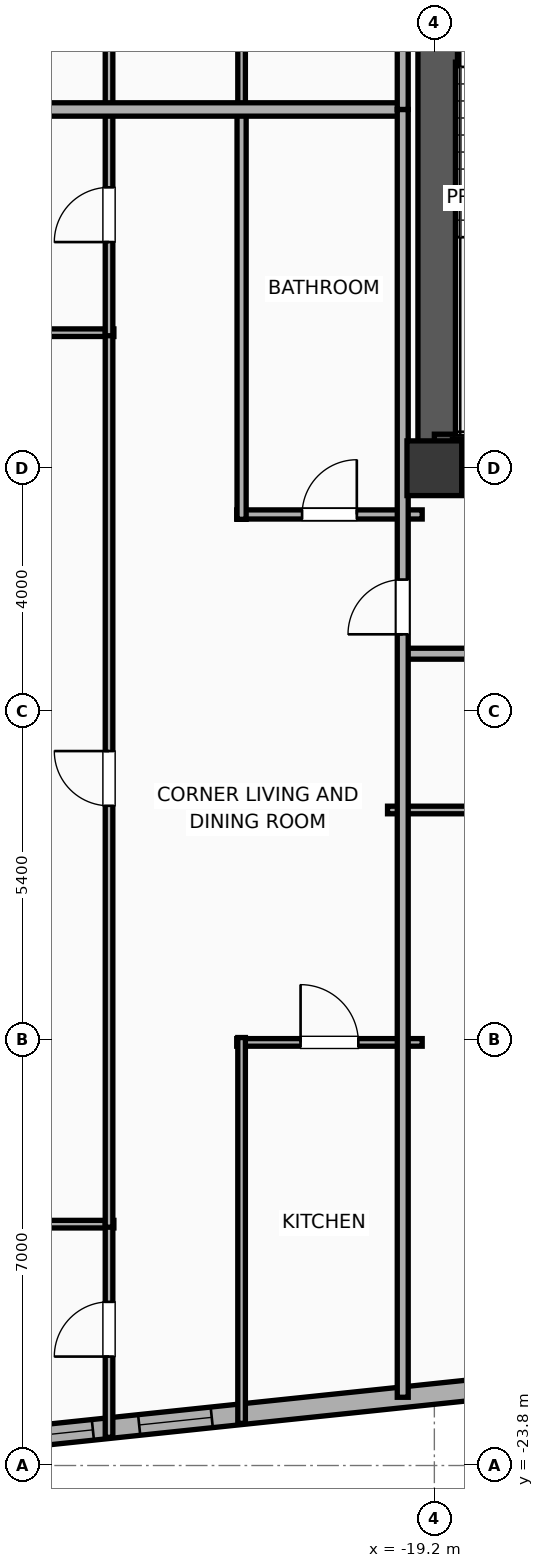
"""IFC4 building model, lengths in metres.
Left out: names, types, materials, properties, quantities, classifications, styles, units other than length and angle.
Written with IfcOpenShell. Run it as: python <this file> out.ifc"""

import sys

from ifc_helpers import new_model, si_unit, direction, frame, frame_2d, origin, origin_2d, place, context, subcontext, project, spatial, rectangle, extrude, element, fill, save


model = new_model("IFC4")
c1 = context("Model", 3, precision=1e-05, world=origin(), true_north=direction((0.0, 1.0)))
c2 = subcontext(c1, "Body", "Model", "MODEL_VIEW")
j1 = project(units=[si_unit("LENGTHUNIT", "METRE"), si_unit("PLANEANGLEUNIT", "RADIAN")], contexts=[c1])
p1 = place(None, origin())
s1 = spatial("IfcSite", under=j1, at=p1, CompositionType="ELEMENT")
p2 = place(p1, origin())
s2 = spatial("IfcBuilding", under=s1, at=p2, CompositionType="ELEMENT")
p3 = place(p2, frame((0.0, 0.0, 159.9)))
s3 = spatial("IfcBuildingStorey", under=s2, at=p3, CompositionType="ELEMENT", Elevation=159.9)
p4 = place(p3, frame((-19.2, -7.4, 0.0), z_axis=(0.0, 0.0, 1.0), x_axis=(1.0, 0.0, 0.0)))
e1 = element("IfcColumn", 1, at=p4, inside=s3, PredefinedType="COLUMN", context=c2, shape_type="SweptSolid", body=[
    extrude(rectangle(XDim=0.9, YDim=0.9, at=origin_2d()), origin(), (0.0, 0.0, 1.0), 3.9),
])
p5 = place(p3, frame((-19.425, -7.4, 0.0), z_axis=(0.0, 0.0, 1.0), x_axis=(1.0, 0.0, 0.0)))
e2 = element("IfcWall", 2, at=p5, inside=s3, PredefinedType="SHEAR", context=c2, shape_type="SweptSolid", body=[
    extrude(rectangle(XDim=7.25, YDim=0.45, at=frame_2d((3.625, 0.0))), origin(), (0.0, 0.0, 1.0), 3.65),
])
p6 = place(p3, frame((-19.145, -7.4, 0.0), z_axis=(0.0, 0.0, 1.0), x_axis=(0.0, 1.0, 0.0)))
e3 = element("IfcWall", 3, at=p6, inside=s3, PredefinedType="SHEAR", context=c2, shape_type="SweptSolid", body=[
    extrude(rectangle(XDim=14.8, YDim=0.65, at=frame_2d((7.4, 0.0))), origin(), (0.0, 0.0, 1.0), 3.65),
])
p7 = place(p3, frame((-19.2, -6.965, 0.0), z_axis=(0.0, 0.0, 1.0), x_axis=(1.0, 0.0, 0.0)))
e4 = element("IfcWall", 4, at=p7, inside=s3, PredefinedType="SOLIDWALL", context=c2, shape_type="SweptSolid", body=[
    extrude(rectangle(XDim=3.46, YDim=0.25, at=frame_2d((1.73, 0.0))), origin(), (0.0, 0.0, 1.0), 3.65),
])
p8 = place(p3, frame((24.756, -18.003, 0.0), z_axis=(0.0, 0.0, 1.0), x_axis=(-0.99452160744, -0.104531202687, 0.0)))
e5 = element("IfcWall", 5, at=p8, inside=s3, PredefinedType="ELEMENTEDWALL", context=c2, shape_type="SweptSolid", body=[
    extrude(rectangle(XDim=51.967, YDim=0.34, at=frame_2d((25.983, 0.0))), origin(), (0.0, 0.0, 1.0), 3.65),
])
p9 = place(p8, frame((25.633, 0.0, 0.75)))
e6 = element("IfcOpeningElement", 6, at=p9, cuts=e5, PredefinedType="OPENING", context=c2, shape_type="SweptSolid", body=[
    extrude(rectangle(XDim=2.4, YDim=2.1, at=frame_2d((1.2, 1.05))), frame((0.0, 0.18, 0.0), z_axis=(0.0, -1.0, 0.0), x_axis=(1.0, 0.0, 0.0)), (0.0, 0.0, 1.0), 0.36),
])
p10 = place(p8, frame((42.369, 0.0, 0.75)))
e7 = element("IfcOpeningElement", 7, at=p10, cuts=e5, PredefinedType="OPENING", context=c2, shape_type="SweptSolid", body=[
    extrude(rectangle(XDim=1.2, YDim=2.05, at=frame_2d((0.6, 1.025))), frame((0.0, 0.18, 0.0), z_axis=(0.0, -1.0, 0.0), x_axis=(1.0, 0.0, 0.0)), (0.0, 0.0, 1.0), 0.36),
])
p11 = place(p8, frame((34.085, 0.0, 0.75)))
e8 = element("IfcOpeningElement", 8, at=p11, cuts=e5, PredefinedType="OPENING", context=c2, shape_type="SweptSolid", body=[
    extrude(rectangle(XDim=1.2, YDim=2.05, at=frame_2d((0.6, 1.025))), frame((0.0, 0.18, 0.0), z_axis=(0.0, -1.0, 0.0), x_axis=(1.0, 0.0, 0.0)), (0.0, 0.0, 1.0), 0.36),
])
p12 = place(p8, frame((36.993, 0.0, 0.75)))
e9 = element("IfcOpeningElement", 9, at=p12, cuts=e5, PredefinedType="OPENING", context=c2, shape_type="SweptSolid", body=[
    extrude(rectangle(XDim=1.2, YDim=2.05, at=frame_2d((0.6, 1.025))), frame((0.0, 0.18, 0.0), z_axis=(0.0, -1.0, 0.0), x_axis=(1.0, 0.0, 0.0)), (0.0, 0.0, 1.0), 0.36),
])
p13 = place(p8, frame((14.397, 0.0, 0.75)))
e10 = element("IfcOpeningElement", 10, at=p13, cuts=e5, PredefinedType="OPENING", context=c2, shape_type="SweptSolid", body=[
    extrude(rectangle(XDim=1.2, YDim=2.05, at=frame_2d((0.6, 1.025))), frame((0.0, 0.18, 0.0), z_axis=(0.0, -1.0, 0.0), x_axis=(1.0, 0.0, 0.0)), (0.0, 0.0, 1.0), 0.36),
])
p14 = place(p8, frame((11.489, 0.0, 0.75)))
e11 = element("IfcOpeningElement", 11, at=p14, cuts=e5, PredefinedType="OPENING", context=c2, shape_type="SweptSolid", body=[
    extrude(rectangle(XDim=1.2, YDim=2.05, at=frame_2d((0.6, 1.025))), frame((0.0, 0.18, 0.0), z_axis=(0.0, -1.0, 0.0), x_axis=(1.0, 0.0, 0.0)), (0.0, 0.0, 1.0), 0.36),
])
p15 = place(p8, frame((8.521, 0.0, 0.75)))
e12 = element("IfcOpeningElement", 12, at=p15, cuts=e5, PredefinedType="OPENING", context=c2, shape_type="SweptSolid", body=[
    extrude(rectangle(XDim=1.2, YDim=2.05, at=frame_2d((0.6, 1.025))), frame((0.0, 0.18, 0.0), z_axis=(0.0, -1.0, 0.0), x_axis=(1.0, 0.0, 0.0)), (0.0, 0.0, 1.0), 0.36),
])
p16 = place(p8, frame((5.582, 0.0, 0.75)))
e13 = element("IfcOpeningElement", 13, at=p16, cuts=e5, PredefinedType="OPENING", context=c2, shape_type="SweptSolid", body=[
    extrude(rectangle(XDim=1.2, YDim=2.05, at=frame_2d((0.6, 1.025))), frame((0.0, 0.18, 0.0), z_axis=(0.0, -1.0, 0.0), x_axis=(1.0, 0.0, 0.0)), (0.0, 0.0, 1.0), 0.36),
])
p17 = place(p8, frame((29.313, 0.0, 0.75)))
e14 = element("IfcOpeningElement", 14, at=p17, cuts=e5, PredefinedType="OPENING", context=c2, shape_type="SweptSolid", body=[
    extrude(rectangle(XDim=1.2, YDim=2.05, at=frame_2d((0.6, 1.025))), frame((0.0, 0.18, 0.0), z_axis=(0.0, -1.0, 0.0), x_axis=(1.0, 0.0, 0.0)), (0.0, 0.0, 1.0), 0.36),
])
p18 = place(p8, frame((22.248, 0.0, 0.75)))
e15 = element("IfcOpeningElement", 15, at=p18, cuts=e5, PredefinedType="OPENING", context=c2, shape_type="SweptSolid", body=[
    extrude(rectangle(XDim=1.2, YDim=2.05, at=frame_2d((0.6, 1.025))), frame((0.0, 0.18, 0.0), z_axis=(0.0, -1.0, 0.0), x_axis=(1.0, 0.0, 0.0)), (0.0, 0.0, 1.0), 0.36),
])
p19 = place(p8, frame((18.186, 0.0, 0.75)))
e16 = element("IfcOpeningElement", 16, at=p19, cuts=e5, PredefinedType="OPENING", context=c2, shape_type="SweptSolid", body=[
    extrude(rectangle(XDim=1.2, YDim=2.05, at=frame_2d((0.6, 1.025))), frame((0.0, 0.18, 0.0), z_axis=(0.0, -1.0, 0.0), x_axis=(1.0, 0.0, 0.0)), (0.0, 0.0, 1.0), 0.36),
])
p20 = place(p8, frame((47.879, 0.0, 0.75)))
e17 = element("IfcOpeningElement", 17, at=p20, cuts=e5, PredefinedType="OPENING", context=c2, shape_type="SweptSolid", body=[
    extrude(rectangle(XDim=1.2, YDim=2.05, at=frame_2d((0.6, 1.025))), frame((0.0, 0.18, 0.0), z_axis=(0.0, -1.0, 0.0), x_axis=(1.0, 0.0, 0.0)), (0.0, 0.0, 1.0), 0.36),
])
p21 = place(p8, frame((49.844, 0.0, 0.75)))
e18 = element("IfcOpeningElement", 18, at=p21, cuts=e5, PredefinedType="OPENING", context=c2, shape_type="SweptSolid", body=[
    extrude(rectangle(XDim=1.2, YDim=2.05, at=frame_2d((0.6, 1.025))), frame((0.0, 0.18, 0.0), z_axis=(0.0, -1.0, 0.0), x_axis=(1.0, 0.0, 0.0)), (0.0, 0.0, 1.0), 0.36),
])
p22 = place(p3, frame((-19.97, -13.02, 0.0), z_axis=(0.0, 0.0, 1.0), x_axis=(1.0, 0.0, 0.0)))
e19 = element("IfcWall", 19, at=p22, inside=s3, PredefinedType="PARTITIONING", context=c2, shape_type="SweptSolid", body=[
    extrude(rectangle(XDim=2.63, YDim=0.125, at=frame_2d((1.315, 0.0))), origin(), (0.0, 0.0, 1.0), 3.65),
])
p23 = place(p3, frame((-19.75, -10.45, 0.0), z_axis=(0.0, 0.0, 1.0), x_axis=(1.0, 0.0, 0.0)))
e20 = element("IfcWall", 20, at=p23, inside=s3, PredefinedType="PARTITIONING", context=c2, shape_type="SweptSolid", body=[
    extrude(rectangle(XDim=11.67, YDim=0.18, at=frame_2d((5.835, 0.0))), origin(), (0.0, 0.0, 1.0), 3.65),
])
p24 = place(p23, frame((2.664, 0.0, 0.0)))
e21 = element("IfcOpeningElement", 21, at=p24, cuts=e20, PredefinedType="OPENING", context=c2, shape_type="SweptSolid", body=[
    extrude(rectangle(XDim=0.9, YDim=2.05, at=frame_2d((0.45, 1.025))), frame((0.0, 0.1, 0.0), z_axis=(0.0, -1.0, 0.0), x_axis=(1.0, 0.0, 0.0)), (0.0, 0.0, 1.0), 0.2),
])
p25 = place(p23, frame((9.404, 0.0, 0.0)))
e22 = element("IfcOpeningElement", 22, at=p25, cuts=e20, PredefinedType="OPENING", context=c2, shape_type="SweptSolid", body=[
    extrude(rectangle(XDim=1.15, YDim=2.05, at=frame_2d((0.575, 1.025))), frame((0.0, 0.1, 0.0), z_axis=(0.0, -1.0, 0.0), x_axis=(1.0, 0.0, 0.0)), (0.0, 0.0, 1.0), 0.2),
])
p26 = place(p3, frame((-31.123, -19.831, 0.0), z_axis=(0.0, 0.0, 1.0), x_axis=(1.0, 0.0, 0.0)))
e23 = element("IfcWall", 23, at=p26, inside=s3, PredefinedType="PARTITIONING", context=c2, shape_type="SweptSolid", body=[
    extrude(rectangle(XDim=6.653, YDim=0.125, at=frame_2d((3.326, 0.0))), origin(), (0.0, 0.0, 1.0), 3.65),
])
p27 = place(p3, frame((-32.664, -5.171, 0.0), z_axis=(0.0, 0.0, 1.0), x_axis=(1.0, 0.0, 0.0)))
e24 = element("IfcWall", 24, at=p27, inside=s3, PredefinedType="PARTITIONING", context=c2, shape_type="SweptSolid", body=[
    extrude(rectangle(XDim=8.194, YDim=0.125, at=frame_2d((4.097, 0.0))), origin(), (0.0, 0.0, 1.0), 3.65),
])
p28 = place(p3, frame((-24.55, -23.336, 0.0), z_axis=(0.0, 0.0, 1.0), x_axis=(0.0, 1.0, 0.0)))
e25 = element("IfcWall", 25, at=p28, inside=s3, PredefinedType="PARTITIONING", context=c2, shape_type="SweptSolid", body=[
    extrude(rectangle(XDim=3.555, YDim=0.125, at=frame_2d((1.778, 0.0))), origin(), (0.0, 0.0, 1.0), 3.65),
])
p29 = place(p28, frame((1.328, 0.0, 0.0)))
e26 = element("IfcOpeningElement", 26, at=p29, cuts=e25, PredefinedType="OPENING", context=c2, shape_type="SweptSolid", body=[
    extrude(rectangle(XDim=0.9, YDim=2.05, at=frame_2d((0.45, 1.025))), frame((0.0, 0.073, 0.0), z_axis=(0.0, -1.0, 0.0), x_axis=(1.0, 0.0, 0.0)), (0.0, 0.0, 1.0), 0.145),
])
p30 = place(p3, frame((-24.55, -19.881, 0.0), z_axis=(0.0, 0.0, 1.0), x_axis=(0.0, 1.0, 0.0)))
e27 = element("IfcWall", 27, at=p30, inside=s3, PredefinedType="PARTITIONING", context=c2, shape_type="SweptSolid", body=[
    extrude(rectangle(XDim=14.76, YDim=0.125, at=frame_2d((7.38, 0.0))), origin(), (0.0, 0.0, 1.0), 3.65),
])
p31 = place(p30, frame((6.93, 0.0, 0.0)))
e28 = element("IfcOpeningElement", 28, at=p31, cuts=e27, PredefinedType="OPENING", context=c2, shape_type="SweptSolid", body=[
    extrude(rectangle(XDim=0.9, YDim=2.05, at=frame_2d((0.45, 1.025))), frame((0.0, 0.073, 0.0), z_axis=(0.0, -1.0, 0.0), x_axis=(1.0, 0.0, 0.0)), (0.0, 0.0, 1.0), 0.145),
])
p32 = place(p3, frame((-24.55, -5.221, 0.0), z_axis=(0.0, 0.0, 1.0), x_axis=(0.0, 1.0, 0.0)))
e29 = element("IfcWall", 29, at=p32, inside=s3, PredefinedType="PARTITIONING", context=c2, shape_type="SweptSolid", body=[
    extrude(rectangle(XDim=3.783, YDim=0.125, at=frame_2d((1.892, 0.0))), origin(), (0.0, 0.0, 1.0), 3.65),
])
p33 = place(p32, frame((1.541, 0.0, 0.0)))
e30 = element("IfcOpeningElement", 30, at=p33, cuts=e29, PredefinedType="OPENING", context=c2, shape_type="SweptSolid", body=[
    extrude(rectangle(XDim=0.9, YDim=2.05, at=frame_2d((0.45, 1.025))), frame((0.0, 0.073, 0.0), z_axis=(0.0, -1.0, 0.0), x_axis=(1.0, 0.0, 0.0)), (0.0, 0.0, 1.0), 0.145),
])
p34 = place(p3, frame((-22.45, -16.842, 0.0), z_axis=(0.0, 0.0, 1.0), x_axis=(1.0, 0.0, 0.0)))
e31 = element("IfcWall", 31, at=p34, inside=s3, PredefinedType="PARTITIONING", context=c2, shape_type="SweptSolid", body=[
    extrude(rectangle(XDim=3.05, YDim=0.125, at=frame_2d((1.525, 0.0))), origin(), (0.0, 0.0, 1.0), 3.65),
])
p35 = place(p34, frame((1.05, 0.0, 0.0)))
e32 = element("IfcOpeningElement", 32, at=p35, cuts=e31, PredefinedType="OPENING", context=c2, shape_type="SweptSolid", body=[
    extrude(rectangle(XDim=0.95, YDim=2.05, at=frame_2d((0.475, 1.025))), frame((0.0, 0.073, 0.0), z_axis=(0.0, -1.0, 0.0), x_axis=(1.0, 0.0, 0.0)), (0.0, 0.0, 1.0), 0.145),
])
p36 = place(p3, frame((-22.45, -8.16, 0.0), z_axis=(0.0, 0.0, 1.0), x_axis=(1.0, 0.0, 0.0)))
e33 = element("IfcWall", 33, at=p36, inside=s3, PredefinedType="PLUMBINGWALL", context=c2, shape_type="SweptSolid", body=[
    extrude(rectangle(XDim=3.05, YDim=0.15, at=frame_2d((1.525, 0.0))), origin(), (0.0, 0.0, 1.0), 3.04),
])
p37 = place(p36, frame((1.075, 0.0, 0.0)))
e34 = element("IfcOpeningElement", 34, at=p37, cuts=e33, PredefinedType="OPENING", context=c2, shape_type="SweptSolid", body=[
    extrude(rectangle(XDim=0.9, YDim=2.05, at=frame_2d((0.45, 1.025))), frame((0.0, 0.085, 0.0), z_axis=(0.0, -1.0, 0.0), x_axis=(1.0, 0.0, 0.0)), (0.0, 0.0, 1.0), 0.17),
])
p38 = place(p3, frame((-22.37, -23.107, 0.0), z_axis=(0.0, 0.0, 1.0), x_axis=(0.0, 1.0, 0.0)))
e35 = element("IfcWall", 35, at=p38, inside=s3, PredefinedType="PARTITIONING", context=c2, shape_type="SweptSolid", body=[
    extrude(rectangle(XDim=6.345, YDim=0.125, at=frame_2d((3.173, 0.0))), origin(), (0.0, 0.0, 1.0), 3.65),
])
p39 = place(p3, frame((-22.37, -8.24, 0.0), z_axis=(0.0, 0.0, 1.0), x_axis=(0.0, 1.0, 0.0)))
e36 = element("IfcWall", 36, at=p39, inside=s3, PredefinedType="PLUMBINGWALL", context=c2, shape_type="SweptSolid", body=[
    extrude(rectangle(XDim=6.72, YDim=0.15, at=frame_2d((3.36, 0.0))), origin(), (0.0, 0.0, 1.0), 3.65),
])
p40 = place(p3, frame((-24.55, -1.562, 0.0), z_axis=(0.0, 0.0, 1.0), x_axis=(0.0, 1.0, 0.0)))
e37 = element("IfcWall", 37, at=p40, inside=s3, PredefinedType="PARTITIONING", context=c2, shape_type="SweptSolid", body=[
    extrude(rectangle(XDim=3.335, YDim=0.125, at=frame_2d((1.668, 0.0))), origin(), (0.0, 0.0, 1.0), 3.65),
])
p41 = place(p40, frame((1.119, 0.0, 0.0)))
e38 = element("IfcOpeningElement", 38, at=p41, cuts=e37, PredefinedType="OPENING", context=c2, shape_type="SweptSolid", body=[
    extrude(rectangle(XDim=0.9, YDim=2.05, at=frame_2d((0.45, 1.025))), frame((0.0, 0.073, 0.0), z_axis=(0.0, -1.0, 0.0), x_axis=(1.0, 0.0, 0.0)), (0.0, 0.0, 1.0), 0.145),
])
p42 = place(p3, frame((-22.37, -1.48, 0.0), z_axis=(0.0, 0.0, 1.0), x_axis=(0.0, 1.0, 0.0)))
e39 = element("IfcWall", 39, at=p42, inside=s3, PredefinedType="PARTITIONING", context=c2, shape_type="SweptSolid", body=[
    extrude(rectangle(XDim=6.72, YDim=0.125, at=frame_2d((3.36, 0.0))), origin(), (0.0, 0.0, 1.0), 3.65),
])
p43 = place(p3, frame((-19.72, -1.5, 0.0), z_axis=(0.0, 0.0, 1.0), x_axis=(-1.0, 0.0, 0.0)))
e40 = element("IfcWall", 40, at=p43, inside=s3, PredefinedType="PARTITIONING", context=c2, shape_type="SweptSolid", body=[
    extrude(rectangle(XDim=13.179, YDim=0.22, at=frame_2d((6.589, 0.0))), origin(), (0.0, 0.0, 1.0), 3.65),
])
p44 = place(p3, frame((-19.72, -22.678, 0.0), z_axis=(0.0, 0.0, 1.0), x_axis=(0.0, 1.0, 0.0)))
e41 = element("IfcWall", 41, at=p44, inside=s3, PredefinedType="PARTITIONING", context=c2, shape_type="SweptSolid", body=[
    extrude(rectangle(XDim=21.178, YDim=0.18, at=frame_2d((10.589, 0.0))), origin(), (0.0, 0.0, 1.0), 3.65),
])
p45 = place(p44, frame((12.547, 0.0, 0.0)))
e42 = element("IfcOpeningElement", 42, at=p45, cuts=e41, PredefinedType="OPENING", context=c2, shape_type="SweptSolid", body=[
    extrude(rectangle(XDim=0.9, YDim=2.05, at=frame_2d((0.45, 1.025))), frame((0.0, 0.1, 0.0), z_axis=(0.0, -1.0, 0.0), x_axis=(1.0, 0.0, 0.0)), (0.0, 0.0, 1.0), 0.2),
])
p46 = place(p3, frame((-19.72, -1.5, 0.0), z_axis=(0.0, 0.0, 1.0), x_axis=(0.0, 1.0, 0.0)))
e43 = element("IfcWall", 43, at=p46, inside=s3, PredefinedType="PARTITIONING", context=c2, shape_type="SweptSolid", body=[
    extrude(rectangle(XDim=19.505, YDim=0.18, at=frame_2d((9.752, 0.0))), origin(), (0.0, 0.0, 1.0), 3.04),
])
p47 = place(p46, frame((10.73, 0.0, 0.0)))
e44 = element("IfcOpeningElement", 44, at=p47, cuts=e43, PredefinedType="OPENING", context=c2, shape_type="SweptSolid", body=[
    extrude(rectangle(XDim=0.9, YDim=2.05, at=frame_2d((0.45, 1.025))), frame((0.0, 0.1, 0.0), z_axis=(0.0, -1.0, 0.0), x_axis=(1.0, 0.0, 0.0)), (0.0, 0.0, 1.0), 0.2),
])
p48 = place(p20, origin())
e45 = element("IfcWindow", 45, at=p48, inside=s3, PartitioningType="SINGLE_PANEL", PredefinedType="WINDOW", context=c2, shape_type="SweptSolid", body=[
    extrude(rectangle(XDim=1.2, YDim=2.05, at=frame_2d((0.6, 1.025))), frame((0.0, 0.03, 0.0), z_axis=(0.0, -1.0, 0.0), x_axis=(1.0, 0.0, 0.0)), (0.0, 0.0, 1.0), 0.06),
])
fill(e17, e45)
p49 = place(p21, origin())
e46 = element("IfcWindow", 46, at=p49, inside=s3, PartitioningType="SINGLE_PANEL", PredefinedType="WINDOW", context=c2, shape_type="SweptSolid", body=[
    extrude(rectangle(XDim=1.2, YDim=2.05, at=frame_2d((0.6, 1.025))), frame((0.0, 0.03, 0.0), z_axis=(0.0, -1.0, 0.0), x_axis=(1.0, 0.0, 0.0)), (0.0, 0.0, 1.0), 0.06),
])
fill(e18, e46)
p50 = place(p29, origin())
e47 = element("IfcDoor", 47, at=p50, inside=s3, OperationType="SINGLE_SWING_LEFT", PredefinedType="DOOR", context=c2, shape_type="SweptSolid", body=[
    extrude(rectangle(XDim=0.9, YDim=2.05, at=frame_2d((0.45, 1.025))), frame((0.0, 0.025, 0.0), z_axis=(0.0, -1.0, 0.0), x_axis=(1.0, 0.0, 0.0)), (0.0, 0.0, 1.0), 0.05),
])
fill(e26, e47)
p51 = place(p31, origin())
e48 = element("IfcDoor", 48, at=p51, inside=s3, OperationType="SINGLE_SWING_RIGHT", PredefinedType="DOOR", context=c2, shape_type="SweptSolid", body=[
    extrude(rectangle(XDim=0.9, YDim=2.05, at=frame_2d((0.45, 1.025))), frame((0.0, 0.025, 0.0), z_axis=(0.0, -1.0, 0.0), x_axis=(1.0, 0.0, 0.0)), (0.0, 0.0, 1.0), 0.05),
])
fill(e28, e48)
p52 = place(p33, origin())
e49 = element("IfcDoor", 49, at=p52, inside=s3, OperationType="SINGLE_SWING_LEFT", PredefinedType="DOOR", context=c2, shape_type="SweptSolid", body=[
    extrude(rectangle(XDim=0.9, YDim=2.05, at=frame_2d((0.45, 1.025))), frame((0.0, 0.025, 0.0), z_axis=(0.0, -1.0, 0.0), x_axis=(1.0, 0.0, 0.0)), (0.0, 0.0, 1.0), 0.05),
])
fill(e30, e49)
p53 = place(p35, origin())
e50 = element("IfcDoor", 50, at=p53, inside=s3, OperationType="SINGLE_SWING_LEFT", PredefinedType="DOOR", context=c2, shape_type="SweptSolid", body=[
    extrude(rectangle(XDim=0.95, YDim=2.05, at=frame_2d((0.475, 1.025))), frame((0.0, 0.025, 0.0), z_axis=(0.0, -1.0, 0.0), x_axis=(1.0, 0.0, 0.0)), (0.0, 0.0, 1.0), 0.05),
])
fill(e32, e50)
p54 = place(p37, origin())
e51 = element("IfcDoor", 51, at=p54, inside=s3, OperationType="SINGLE_SWING_RIGHT", PredefinedType="DOOR", context=c2, shape_type="SweptSolid", body=[
    extrude(rectangle(XDim=0.9, YDim=2.05, at=frame_2d((0.45, 1.025))), frame((0.0, 0.025, 0.0), z_axis=(0.0, -1.0, 0.0), x_axis=(1.0, 0.0, 0.0)), (0.0, 0.0, 1.0), 0.05),
])
fill(e34, e51)
p55 = place(p45, origin())
e52 = element("IfcDoor", 52, at=p55, inside=s3, OperationType="SINGLE_SWING_LEFT", PredefinedType="DOOR", context=c2, shape_type="SweptSolid", body=[
    extrude(rectangle(XDim=0.9, YDim=2.05, at=frame_2d((0.45, 1.025))), frame((0.0, 0.025, 0.0), z_axis=(0.0, -1.0, 0.0), x_axis=(1.0, 0.0, 0.0)), (0.0, 0.0, 1.0), 0.05),
])
fill(e42, e52)
save(model, sys.argv[1])
